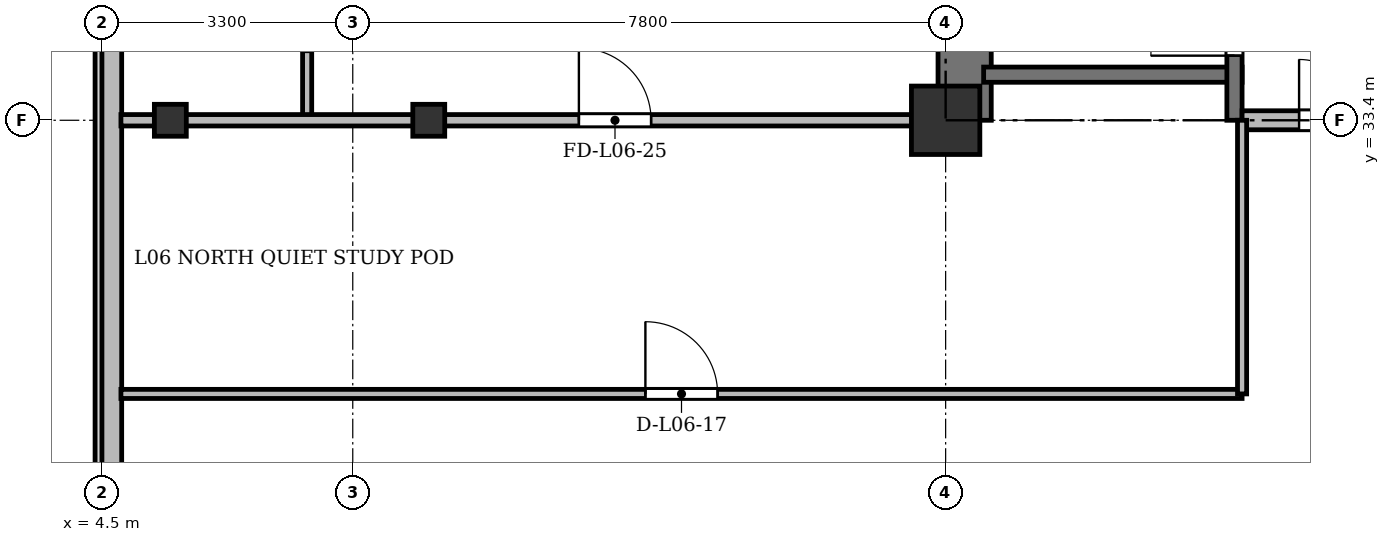
"""IFC4 building model, lengths in metres.
Left out: names, types, materials, properties, quantities, classifications, styles, units other than length and angle.
Written with IfcOpenShell. Run it as: python <this file> out.ifc"""

import sys

from ifc_helpers import new_model, si_unit, direction, frame, frame_2d, origin, origin_2d, place, context, subcontext, project, spatial, rectangle, i_section, extrude, source, transform, mapped, element, fill, save


model = new_model("IFC4")
c1 = context("Model", 3, precision=1e-05, world=origin(), true_north=direction((0.0, 1.0)))
c2 = subcontext(c1, "Body", "Model", "MODEL_VIEW")
j1 = project(units=[si_unit("LENGTHUNIT", "METRE"), si_unit("PLANEANGLEUNIT", "RADIAN")], contexts=[c1])
p1 = place(None, origin())
s1 = spatial("IfcSite", under=j1, at=p1, CompositionType="ELEMENT")
p2 = place(p1, origin())
s2 = spatial("IfcBuilding", under=s1, at=p2, CompositionType="ELEMENT")
p3 = place(p2, frame((0.0, 0.0, 27.1)))
s3 = spatial("IfcBuildingStorey", under=s2, at=p3, CompositionType="ELEMENT", Elevation=27.1)
m1 = source(origin(), c2, "Body", "SweptSolid", [
    extrude(i_section(OverallWidth=0.42, OverallDepth=0.42, WebThickness=0.026, FlangeThickness=0.04, at=origin_2d()), origin(), (0.0, 0.0, 1.0), 3.6),
])
for number, where, z_axis, x_axis in (
    (1, (5.4, 33.4, 0.0), (0.0, 0.0, 1.0), (1.0, 0.0, 0.0)),
    (2, (8.8, 33.4, 0.0), (0.0, 0.0, 1.0), (1.0, 0.0, 0.0)),
):
    element("IfcColumn", number, at=place(p3, frame(where, z_axis=z_axis, x_axis=x_axis)), inside=s3, PredefinedType="COLUMN", context=c2, shape_type="MappedRepresentation", body=[
        mapped(m1, transform((0.0, 0.0, 0.0), x_axis=(1.0, 0.0, 0.0), y_axis=(0.0, 1.0, 0.0), z_axis=(0.0, 0.0, 1.0), scale=1.0)),
    ])
m2 = source(origin(), c2, "Body", "SweptSolid", [
    extrude(rectangle(XDim=0.9, YDim=0.9, at=origin_2d()), origin(), (0.0, 0.0, 1.0), 3.6),
])
p4 = place(p3, frame((15.6, 33.4, 0.0), z_axis=(0.0, 0.0, 1.0), x_axis=(1.0, 0.0, 0.0)))
e3 = element("IfcColumn", 3, at=p4, inside=s3, PredefinedType="COLUMN", context=c2, shape_type="MappedRepresentation", body=[
    mapped(m2, transform((0.0, 0.0, 0.0), x_axis=(1.0, 0.0, 0.0), y_axis=(0.0, 1.0, 0.0), z_axis=(0.0, 0.0, 1.0), scale=1.0)),
])
p5 = place(p3, frame((4.63, 5.9, 0.0), z_axis=(0.0, 0.0, 1.0), x_axis=(0.0, 1.0, 0.0)))
e4 = element("IfcWall", 4, at=p5, inside=s3, PredefinedType="SOLIDWALL", context=c2, shape_type="SweptSolid", body=[
    extrude(rectangle(XDim=39.6, YDim=0.26, at=frame_2d((19.8, 0.0))), origin(), (0.0, 0.0, 1.0), 3.34),
])
p6 = place(p5, frame((1.45, 0.0, 0.92)))
e5 = element("IfcOpeningElement", 5, at=p6, cuts=e4, PredefinedType="OPENING", context=c2, shape_type="SweptSolid", body=[
    extrude(rectangle(XDim=1.2, YDim=1.65, at=frame_2d((0.6, 0.825))), frame((0.0, 0.14, 0.0), z_axis=(0.0, -1.0, 0.0), x_axis=(1.0, 0.0, 0.0)), (0.0, 0.0, 1.0), 0.28),
])
p7 = place(p5, frame((4.2, 0.0, 0.92)))
e6 = element("IfcOpeningElement", 6, at=p7, cuts=e4, PredefinedType="OPENING", context=c2, shape_type="SweptSolid", body=[
    extrude(rectangle(XDim=2.6, YDim=1.9, at=frame_2d((1.3, 0.95))), frame((0.0, 0.14, 0.0), z_axis=(0.0, -1.0, 0.0), x_axis=(1.0, 0.0, 0.0)), (0.0, 0.0, 1.0), 0.28),
])
p8 = place(p5, frame((8.4, 0.0, 0.92)))
e7 = element("IfcOpeningElement", 7, at=p8, cuts=e4, PredefinedType="OPENING", context=c2, shape_type="SweptSolid", body=[
    extrude(rectangle(XDim=2.6, YDim=1.9, at=frame_2d((1.3, 0.95))), frame((0.0, 0.14, 0.0), z_axis=(0.0, -1.0, 0.0), x_axis=(1.0, 0.0, 0.0)), (0.0, 0.0, 1.0), 0.28),
])
p9 = place(p5, frame((33.9, 0.0, 0.92)))
e8 = element("IfcOpeningElement", 8, at=p9, cuts=e4, PredefinedType="OPENING", context=c2, shape_type="SweptSolid", body=[
    extrude(rectangle(XDim=1.2, YDim=1.65, at=frame_2d((0.6, 0.825))), frame((0.0, 0.14, 0.0), z_axis=(0.0, -1.0, 0.0), x_axis=(1.0, 0.0, 0.0)), (0.0, 0.0, 1.0), 0.28),
])
p10 = place(p5, frame((37.25, 0.0, 0.92)))
e9 = element("IfcOpeningElement", 9, at=p10, cuts=e4, PredefinedType="OPENING", context=c2, shape_type="SweptSolid", body=[
    extrude(rectangle(XDim=1.2, YDim=1.65, at=frame_2d((0.6, 0.825))), frame((0.0, 0.14, 0.0), z_axis=(0.0, -1.0, 0.0), x_axis=(1.0, 0.0, 0.0)), (0.0, 0.0, 1.0), 0.28),
])
p11 = place(p3, frame((15.85, 33.4, 0.0), z_axis=(0.0, 0.0, 1.0), x_axis=(0.0, 1.0, 0.0)))
e10 = element("IfcWall", 10, at=p11, inside=s3, PredefinedType="SHEAR", context=c2, shape_type="SweptSolid", body=[
    extrude(rectangle(XDim=11.7, YDim=0.7, at=frame_2d((5.85, 0.0))), origin(), (0.0, 0.0, 1.0), 3.34),
])
p12 = place(p3, frame((16.1, 34.0, 0.0), z_axis=(0.0, 0.0, 1.0), x_axis=(1.0, 0.0, 0.0)))
e11 = element("IfcWall", 11, at=p12, inside=s3, PredefinedType="SHEAR", context=c2, shape_type="SweptSolid", body=[
    extrude(rectangle(XDim=3.4, YDim=0.2, at=frame_2d((1.7, 0.0))), origin(), (0.0, 0.0, 1.0), 3.34),
])
p13 = place(p3, frame((19.4, 33.4, 0.0), z_axis=(0.0, 0.0, 1.0), x_axis=(0.0, 1.0, 0.0)))
e12 = element("IfcWall", 12, at=p13, inside=s3, PredefinedType="SHEAR", context=c2, shape_type="SweptSolid", body=[
    extrude(rectangle(XDim=11.1, YDim=0.2, at=frame_2d((5.55, 0.0))), origin(), (0.0, 0.0, 1.0), 3.34),
])
p14 = place(p13, frame((0.85, 0.0, 0.0)))
e13 = element("IfcOpeningElement", 13, at=p14, cuts=e12, PredefinedType="OPENING", context=c2, shape_type="SweptSolid", body=[
    extrude(rectangle(XDim=1.1, YDim=2.15, at=frame_2d((0.55, 1.075))), frame((0.0, 0.11, 0.0), z_axis=(0.0, -1.0, 0.0), x_axis=(1.0, 0.0, 0.0)), (0.0, 0.0, 1.0), 0.22),
])
p15 = place(p3, frame((19.5, 33.4, 0.0), z_axis=(0.0, 0.0, 1.0), x_axis=(1.0, 0.0, 0.0)))
e14 = element("IfcWall", 14, at=p15, inside=s3, PredefinedType="PARTITIONING", context=c2, shape_type="SweptSolid", body=[
    extrude(rectangle(XDim=6.8, YDim=0.25, at=frame_2d((3.4, 0.0))), origin(), (0.0, 0.0, 1.0), 2.69),
])
p16 = place(p15, frame((0.75, 0.0, 0.0)))
e15 = element("IfcOpeningElement", 15, at=p16, cuts=e14, PredefinedType="OPENING", context=c2, shape_type="SweptSolid", body=[
    extrude(rectangle(XDim=1.6, YDim=2.2, at=frame_2d((0.8, 1.1))), frame((0.0, 0.135, 0.0), z_axis=(0.0, -1.0, 0.0), x_axis=(1.0, 0.0, 0.0)), (0.0, 0.0, 1.0), 0.27),
])
p17 = place(p3, frame((4.75, 29.8, 0.0), z_axis=(0.0, 0.0, 1.0), x_axis=(1.0, 0.0, 0.0)))
e16 = element("IfcWall", 16, at=p17, inside=s3, PredefinedType="PARTITIONING", context=c2, shape_type="SweptSolid", body=[
    extrude(rectangle(XDim=14.75, YDim=0.12, at=frame_2d((7.375, 0.0))), origin(), (0.0, 0.0, 1.0), 2.752),
])
p18 = place(p17, frame((6.9, 0.0, 0.0)))
e17 = element("IfcOpeningElement", 17, at=p18, cuts=e16, PredefinedType="OPENING", context=c2, shape_type="SweptSolid", body=[
    extrude(rectangle(XDim=0.95, YDim=2.15, at=frame_2d((0.475, 1.075))), frame((0.0, 0.07, 0.0), z_axis=(0.0, -1.0, 0.0), x_axis=(1.0, 0.0, 0.0)), (0.0, 0.0, 1.0), 0.14),
])
p19 = place(p3, frame((19.5, 29.8, 0.0), z_axis=(0.0, 0.0, 1.0), x_axis=(0.0, 1.0, 0.0)))
e18 = element("IfcWall", 18, at=p19, inside=s3, PredefinedType="PARTITIONING", context=c2, shape_type="SweptSolid", body=[
    extrude(rectangle(XDim=3.6, YDim=0.12, at=frame_2d((1.8, 0.0))), origin(), (0.0, 0.0, 1.0), 2.69),
])
p20 = place(p3, frame((7.2, 33.4, 0.0), z_axis=(0.0, 0.0, 1.0), x_axis=(0.0, 1.0, 0.0)))
e19 = element("IfcWall", 19, at=p20, inside=s3, PredefinedType="PARTITIONING", context=c2, shape_type="SweptSolid", body=[
    extrude(rectangle(XDim=3.25, YDim=0.12, at=frame_2d((1.625, 0.0))), origin(), (0.0, 0.0, 1.0), 2.69),
])
p21 = place(p20, frame((0.9, 0.0, 0.0)))
e20 = element("IfcOpeningElement", 20, at=p21, cuts=e19, PredefinedType="OPENING", context=c2, shape_type="SweptSolid", body=[
    extrude(rectangle(XDim=0.85, YDim=2.1, at=frame_2d((0.425, 1.05))), frame((0.0, 0.07, 0.0), z_axis=(0.0, -1.0, 0.0), x_axis=(1.0, 0.0, 0.0)), (0.0, 0.0, 1.0), 0.14),
])
p22 = place(p3, frame((4.75, 33.4, 0.0), z_axis=(0.0, 0.0, 1.0), x_axis=(1.0, 0.0, 0.0)))
e21 = element("IfcWall", 21, at=p22, inside=s3, PredefinedType="PARTITIONING", context=c2, shape_type="SweptSolid", body=[
    extrude(rectangle(XDim=10.85, YDim=0.15, at=frame_2d((5.425, 0.0))), origin(), (0.0, 0.0, 1.0), 2.69),
])
p23 = place(p22, frame((6.025, 0.0, 0.0)))
e22 = element("IfcOpeningElement", 22, at=p23, cuts=e21, PredefinedType="OPENING", context=c2, shape_type="SweptSolid", body=[
    extrude(rectangle(XDim=0.95, YDim=2.15, at=frame_2d((0.475, 1.075))), frame((0.0, 0.085, 0.0), z_axis=(0.0, -1.0, 0.0), x_axis=(1.0, 0.0, 0.0)), (0.0, 0.0, 1.0), 0.17),
])
m3 = source(origin(), c2, "Body", "SweptSolid", [
    extrude(rectangle(XDim=1.1, YDim=2.15, at=frame_2d((0.55, 1.075))), frame((0.0, 0.025, 0.0), z_axis=(0.0, -1.0, 0.0), x_axis=(1.0, 0.0, 0.0)), (0.0, 0.0, 1.0), 0.05),
])
p24 = place(p14, origin())
e23 = element("IfcDoor", 23, at=p24, inside=s3, OperationType="SINGLE_SWING_LEFT", PredefinedType="DOOR", context=c2, shape_type="MappedRepresentation", body=[
    mapped(m3, transform((0.0, 0.0, 0.0), x_axis=(1.0, 0.0, 0.0), y_axis=(0.0, 1.0, 0.0), z_axis=(0.0, 0.0, 1.0), scale=1.0)),
])
fill(e13, e23)
m4 = source(origin(), c2, "Body", "SweptSolid", [
    extrude(rectangle(XDim=1.6, YDim=2.2, at=frame_2d((0.8, 1.1))), frame((0.0, 0.025, 0.0), z_axis=(0.0, -1.0, 0.0), x_axis=(1.0, 0.0, 0.0)), (0.0, 0.0, 1.0), 0.05),
])
p25 = place(p16, origin())
e24 = element("IfcDoor", 24, at=p25, inside=s3, OperationType="DOUBLE_DOOR_SINGLE_SWING", PredefinedType="DOOR", context=c2, shape_type="MappedRepresentation", body=[
    mapped(m4, transform((0.0, 0.0, 0.0), x_axis=(1.0, 0.0, 0.0), y_axis=(0.0, 1.0, 0.0), z_axis=(0.0, 0.0, 1.0), scale=1.0)),
])
fill(e15, e24)
m5 = source(origin(), c2, "Body", "SweptSolid", [
    extrude(rectangle(XDim=0.95, YDim=2.15, at=frame_2d((0.475, 1.075))), frame((0.0, 0.025, 0.0), z_axis=(0.0, -1.0, 0.0), x_axis=(1.0, 0.0, 0.0)), (0.0, 0.0, 1.0), 0.05),
])
p26 = place(p18, origin())
e25 = element("IfcDoor", 25, at=p26, inside=s3, OperationType="SINGLE_SWING_LEFT", PredefinedType="DOOR", context=c2, shape_type="MappedRepresentation", body=[
    mapped(m5, transform((0.0, 0.0, 0.0), x_axis=(1.0, 0.0, 0.0), y_axis=(0.0, 1.0, 0.0), z_axis=(0.0, 0.0, 1.0), scale=1.0)),
])
fill(e17, e25)
m6 = source(origin(), c2, "Body", "SweptSolid", [
    extrude(rectangle(XDim=0.85, YDim=2.1, at=frame_2d((0.425, 1.05))), frame((0.0, 0.025, 0.0), z_axis=(0.0, -1.0, 0.0), x_axis=(1.0, 0.0, 0.0)), (0.0, 0.0, 1.0), 0.05),
])
p27 = place(p21, origin())
e26 = element("IfcDoor", 26, at=p27, inside=s3, OperationType="SINGLE_SWING_RIGHT", PredefinedType="DOOR", context=c2, shape_type="MappedRepresentation", body=[
    mapped(m6, transform((0.0, 0.0, 0.0), x_axis=(1.0, 0.0, 0.0), y_axis=(0.0, 1.0, 0.0), z_axis=(0.0, 0.0, 1.0), scale=1.0)),
])
fill(e20, e26)
p28 = place(p23, origin())
e27 = element("IfcDoor", 27, at=p28, inside=s3, OperationType="SINGLE_SWING_LEFT", PredefinedType="DOOR", context=c2, shape_type="MappedRepresentation", body=[
    mapped(m5, transform((0.0, 0.0, 0.0), x_axis=(1.0, 0.0, 0.0), y_axis=(0.0, 1.0, 0.0), z_axis=(0.0, 0.0, 1.0), scale=1.0)),
])
fill(e22, e27)
save(model, sys.argv[1])
